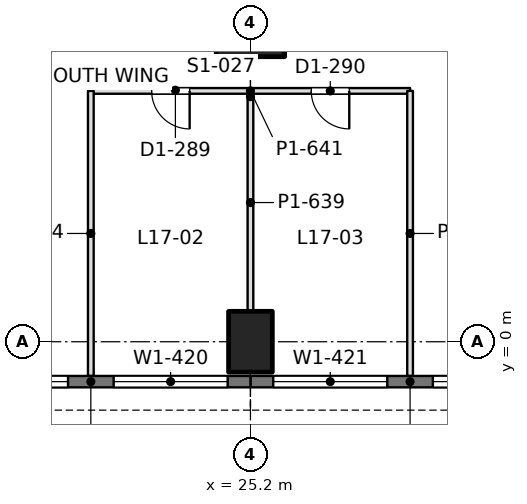
"""IFC4 building model, lengths in metres.
Left out: names, types, materials, properties, quantities, classifications, styles, units other than length and angle.
Written with IfcOpenShell. Run it as: python <this file> out.ifc"""

import sys

from ifc_helpers import new_model, si_unit, direction, frame, frame_2d, origin, origin_2d, place, context, subcontext, project, spatial, rectangle, extrude, element, fill, save


model = new_model("IFC4")
c1 = context("Model", 3, precision=1e-05, world=origin(), true_north=direction((0.0, 1.0)))
c2 = subcontext(c1, "Body", "Model", "MODEL_VIEW")
j1 = project(units=[si_unit("LENGTHUNIT", "METRE"), si_unit("PLANEANGLEUNIT", "RADIAN")], contexts=[c1])
p1 = place(None, origin())
s1 = spatial("IfcSite", under=j1, at=p1, CompositionType="ELEMENT")
p2 = place(p1, origin())
s2 = spatial("IfcBuilding", under=s1, at=p2, CompositionType="ELEMENT")
p3 = place(p2, frame((0.0, 0.0, 77.4)))
s3 = spatial("IfcBuildingStorey", under=s2, at=p3, CompositionType="ELEMENT", Elevation=77.4)
p4 = place(p3, frame((25.2, 0.0, 0.0), z_axis=(0.0, 0.0, 1.0), x_axis=(1.0, 0.0, 0.0)))
e1 = element("IfcColumn", 1, at=p4, inside=s3, PredefinedType="COLUMN", context=c2, shape_type="SweptSolid", body=[
    extrude(rectangle(XDim=1.15, YDim=1.6, at=origin_2d()), origin(), (0.0, 0.0, 1.0), 4.5),
])
p5 = place(p3, frame((25.2, 8.4, 0.0), z_axis=(0.0, 0.0, 1.0), x_axis=(1.0, 0.0, 0.0)))
e2 = element("IfcColumn", 2, at=p5, inside=s3, PredefinedType="COLUMN", context=c2, shape_type="SweptSolid", body=[
    extrude(rectangle(XDim=1.8, YDim=1.8, at=origin_2d()), origin(), (0.0, 0.0, 1.0), 4.5),
])
p6 = place(p3, frame((33.6, -1.05, 0.0), z_axis=(0.0, 0.0, 1.0), x_axis=(-1.0, 0.0, 0.0)))
e3 = element("IfcWall", 3, at=p6, inside=s3, PredefinedType="SOLIDWALL", context=c2, shape_type="SweptSolid", body=[
    extrude(rectangle(XDim=8.4, YDim=0.3, at=frame_2d((4.2, 0.0))), origin(), (0.0, 0.0, 1.0), 4.34),
])
p7 = place(p6, frame((0.6, 0.0, 0.9)))
e4 = element("IfcOpeningElement", 4, at=p7, cuts=e3, PredefinedType="OPENING", context=c2, shape_type="SweptSolid", body=[
    extrude(rectangle(XDim=3.0, YDim=1.9, at=frame_2d((1.5, 0.95))), frame((0.0, 0.16, 0.0), z_axis=(0.0, -1.0, 0.0), x_axis=(1.0, 0.0, 0.0)), (0.0, 0.0, 1.0), 0.32),
])
p8 = place(p6, frame((4.8, 0.0, 0.9)))
e5 = element("IfcOpeningElement", 5, at=p8, cuts=e3, PredefinedType="OPENING", context=c2, shape_type="SweptSolid", body=[
    extrude(rectangle(XDim=3.0, YDim=1.9, at=frame_2d((1.5, 0.95))), frame((0.0, 0.16, 0.0), z_axis=(0.0, -1.0, 0.0), x_axis=(1.0, 0.0, 0.0)), (0.0, 0.0, 1.0), 0.32),
])
p9 = place(p3, frame((25.2, -1.05, 0.0), z_axis=(0.0, 0.0, 1.0), x_axis=(-1.0, 0.0, 0.0)))
e6 = element("IfcWall", 6, at=p9, inside=s3, PredefinedType="SOLIDWALL", context=c2, shape_type="SweptSolid", body=[
    extrude(rectangle(XDim=8.4, YDim=0.3, at=frame_2d((4.2, 0.0))), origin(), (0.0, 0.0, 1.0), 4.34),
])
p10 = place(p9, frame((0.6, 0.0, 0.9)))
e7 = element("IfcOpeningElement", 7, at=p10, cuts=e6, PredefinedType="OPENING", context=c2, shape_type="SweptSolid", body=[
    extrude(rectangle(XDim=3.0, YDim=1.9, at=frame_2d((1.5, 0.95))), frame((0.0, 0.16, 0.0), z_axis=(0.0, -1.0, 0.0), x_axis=(1.0, 0.0, 0.0)), (0.0, 0.0, 1.0), 0.32),
])
p11 = place(p9, frame((4.8, 0.0, 0.9)))
e8 = element("IfcOpeningElement", 8, at=p11, cuts=e6, PredefinedType="OPENING", context=c2, shape_type="SweptSolid", body=[
    extrude(rectangle(XDim=3.0, YDim=1.9, at=frame_2d((1.5, 0.95))), frame((0.0, 0.16, 0.0), z_axis=(0.0, -1.0, 0.0), x_axis=(1.0, 0.0, 0.0)), (0.0, 0.0, 1.0), 0.32),
])
p12 = place(p3, frame((21.0, 6.6, 0.0), z_axis=(0.0, 0.0, 1.0), x_axis=(1.0, 0.0, 0.0)))
e9 = element("IfcWall", 9, at=p12, inside=s3, PredefinedType="PARTITIONING", context=c2, shape_type="SweptSolid", body=[
    extrude(rectangle(XDim=8.4, YDim=0.15, at=frame_2d((4.2, 0.0))), origin(), (0.0, 0.0, 1.0), 3.74),
])
p13 = place(p12, frame((1.6, 0.0, 0.0)))
e10 = element("IfcOpeningElement", 10, at=p13, cuts=e9, PredefinedType="OPENING", context=c2, shape_type="SweptSolid", body=[
    extrude(rectangle(XDim=1.0, YDim=2.2, at=frame_2d((0.5, 1.1))), frame((0.0, 0.085, 0.0), z_axis=(0.0, -1.0, 0.0), x_axis=(1.0, 0.0, 0.0)), (0.0, 0.0, 1.0), 0.17),
])
p14 = place(p12, frame((5.8, 0.0, 0.0)))
e11 = element("IfcOpeningElement", 11, at=p14, cuts=e9, PredefinedType="OPENING", context=c2, shape_type="SweptSolid", body=[
    extrude(rectangle(XDim=1.0, YDim=2.2, at=frame_2d((0.5, 1.1))), frame((0.0, 0.085, 0.0), z_axis=(0.0, -1.0, 0.0), x_axis=(1.0, 0.0, 0.0)), (0.0, 0.0, 1.0), 0.17),
])
p15 = place(p3, frame((21.0, -0.902, 0.0), z_axis=(0.0, 0.0, 1.0), x_axis=(0.0, 1.0, 0.0)))
e12 = element("IfcWall", 12, at=p15, inside=s3, PredefinedType="PARTITIONING", context=c2, shape_type="SweptSolid", body=[
    extrude(rectangle(XDim=7.502, YDim=0.15, at=frame_2d((3.751, 0.0))), origin(), (0.0, 0.0, 1.0), 3.84),
])
p16 = place(p3, frame((25.2, 0.799, 0.0), z_axis=(0.0, 0.0, 1.0), x_axis=(0.0, 1.0, 0.0)))
e13 = element("IfcWall", 13, at=p16, inside=s3, PredefinedType="PARTITIONING", context=c2, shape_type="SweptSolid", body=[
    extrude(rectangle(XDim=5.727, YDim=0.15, at=frame_2d((2.863, 0.0))), origin(), (0.0, 0.0, 1.0), 3.74),
])
p17 = place(p3, frame((29.4, -0.902, 0.0), z_axis=(0.0, 0.0, 1.0), x_axis=(0.0, 1.0, 0.0)))
e14 = element("IfcWall", 14, at=p17, inside=s3, PredefinedType="PARTITIONING", context=c2, shape_type="SweptSolid", body=[
    extrude(rectangle(XDim=7.502, YDim=0.15, at=frame_2d((3.751, 0.0))), origin(), (0.0, 0.0, 1.0), 3.84),
])
p18 = place(p7, origin())
e15 = element("IfcWindow", 15, at=p18, inside=s3, PartitioningType="SINGLE_PANEL", PredefinedType="WINDOW", context=c2, shape_type="SweptSolid", body=[
    extrude(rectangle(XDim=3.0, YDim=1.9, at=frame_2d((1.5, 0.95))), frame((0.0, 0.03, 0.0), z_axis=(0.0, -1.0, 0.0), x_axis=(1.0, 0.0, 0.0)), (0.0, 0.0, 1.0), 0.06),
])
fill(e4, e15)
p19 = place(p8, origin())
e16 = element("IfcWindow", 16, at=p19, inside=s3, PartitioningType="SINGLE_PANEL", PredefinedType="WINDOW", context=c2, shape_type="SweptSolid", body=[
    extrude(rectangle(XDim=3.0, YDim=1.9, at=frame_2d((1.5, 0.95))), frame((0.0, 0.03, 0.0), z_axis=(0.0, -1.0, 0.0), x_axis=(1.0, 0.0, 0.0)), (0.0, 0.0, 1.0), 0.06),
])
fill(e5, e16)
p20 = place(p10, origin())
e17 = element("IfcWindow", 17, at=p20, inside=s3, PartitioningType="SINGLE_PANEL", PredefinedType="WINDOW", context=c2, shape_type="SweptSolid", body=[
    extrude(rectangle(XDim=3.0, YDim=1.9, at=frame_2d((1.5, 0.95))), frame((0.0, 0.03, 0.0), z_axis=(0.0, -1.0, 0.0), x_axis=(1.0, 0.0, 0.0)), (0.0, 0.0, 1.0), 0.06),
])
fill(e7, e17)
p21 = place(p11, origin())
e18 = element("IfcWindow", 18, at=p21, inside=s3, PartitioningType="SINGLE_PANEL", PredefinedType="WINDOW", context=c2, shape_type="SweptSolid", body=[
    extrude(rectangle(XDim=3.0, YDim=1.9, at=frame_2d((1.5, 0.95))), frame((0.0, 0.03, 0.0), z_axis=(0.0, -1.0, 0.0), x_axis=(1.0, 0.0, 0.0)), (0.0, 0.0, 1.0), 0.06),
])
fill(e8, e18)
p22 = place(p13, frame((1.0, 0.0, 0.0), z_axis=(0.0, 0.0, 1.0), x_axis=(-1.0, 0.0, 0.0)))
e19 = element("IfcDoor", 19, at=p22, inside=s3, OperationType="SINGLE_SWING_LEFT", PredefinedType="DOOR", context=c2, shape_type="SweptSolid", body=[
    extrude(rectangle(XDim=1.0, YDim=2.2, at=frame_2d((0.5, 1.1))), frame((0.0, 0.025, 0.0), z_axis=(0.0, -1.0, 0.0), x_axis=(1.0, 0.0, 0.0)), (0.0, 0.0, 1.0), 0.05),
])
fill(e10, e19)
p23 = place(p14, frame((1.0, 0.0, 0.0), z_axis=(0.0, 0.0, 1.0), x_axis=(-1.0, 0.0, 0.0)))
e20 = element("IfcDoor", 20, at=p23, inside=s3, OperationType="SINGLE_SWING_LEFT", PredefinedType="DOOR", context=c2, shape_type="SweptSolid", body=[
    extrude(rectangle(XDim=1.0, YDim=2.2, at=frame_2d((0.5, 1.1))), frame((0.0, 0.025, 0.0), z_axis=(0.0, -1.0, 0.0), x_axis=(1.0, 0.0, 0.0)), (0.0, 0.0, 1.0), 0.05),
])
fill(e11, e20)
save(model, sys.argv[1])
